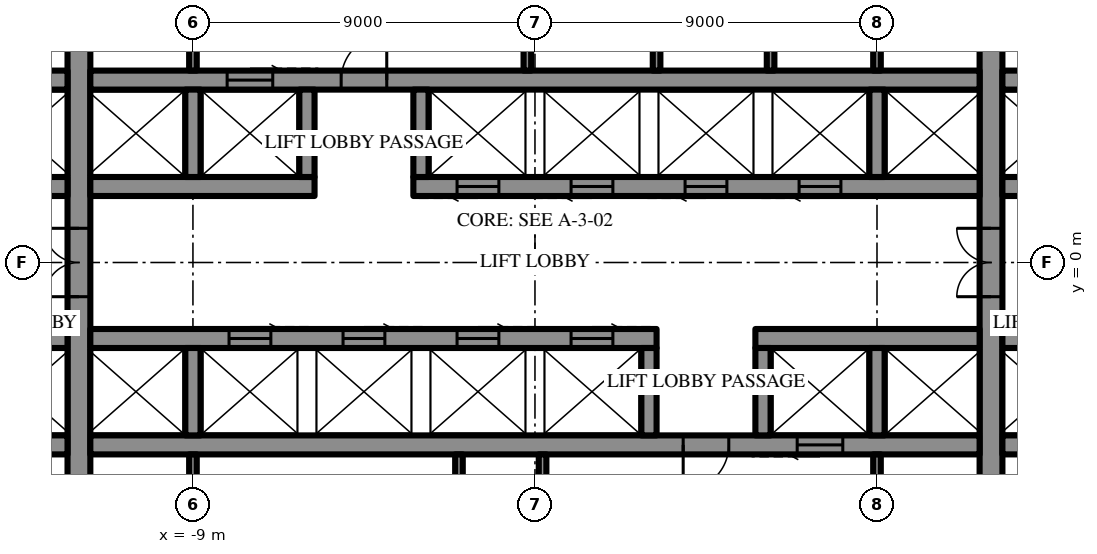
"""IFC4 building model, lengths in metres.
Left out: names, types, materials, properties, quantities, classifications, styles, units other than length and angle.
Written with IfcOpenShell. Run it as: python <this file> out.ifc"""

import sys

from ifc_helpers import new_model, si_unit, direction, frame, frame_2d, origin, place, context, subcontext, project, spatial, rectangle, extrude, element, fill, save


model = new_model("IFC4")
c1 = context("Model", 3, precision=1e-05, world=origin(), true_north=direction((0.0, 1.0)))
c2 = subcontext(c1, "Body", "Model", "MODEL_VIEW")
j1 = project(units=[si_unit("LENGTHUNIT", "METRE"), si_unit("PLANEANGLEUNIT", "RADIAN")], contexts=[c1])
p1 = place(None, origin())
s1 = spatial("IfcSite", under=j1, at=p1, CompositionType="ELEMENT")
p2 = place(p1, origin())
s2 = spatial("IfcBuilding", under=s1, at=p2, CompositionType="ELEMENT")
p3 = place(p2, frame((0.0, 0.0, 153.1)))
s3 = spatial("IfcBuildingStorey", under=s2, at=p3, CompositionType="ELEMENT", Elevation=153.1)
p4 = place(p3, frame((12.0, -10.7, 0.0), z_axis=(0.0, 0.0, 1.0), x_axis=(0.0, 1.0, 0.0)))
e1 = element("IfcWall", 1, at=p4, inside=s3, PredefinedType="SHEAR", context=c2, shape_type="SweptSolid", body=[
    extrude(rectangle(XDim=21.4, YDim=0.6, at=frame_2d((10.7, 0.0))), origin(), (0.0, 0.0, 1.0), 4.2),
])
p5 = place(p4, frame((9.8, 0.0, 0.0)))
e2 = element("IfcOpeningElement", 2, at=p5, cuts=e1, PredefinedType="OPENING", context=c2, shape_type="SweptSolid", body=[
    extrude(rectangle(XDim=1.8, YDim=2.4, at=frame_2d((0.9, 1.2))), frame((0.0, 0.31, 0.0), z_axis=(0.0, -1.0, 0.0), x_axis=(1.0, 0.0, 0.0)), (0.0, 0.0, 1.0), 0.62),
])
p6 = place(p3, frame((-12.0, -10.7, 0.0), z_axis=(0.0, 0.0, 1.0), x_axis=(0.0, 1.0, 0.0)))
e3 = element("IfcWall", 3, at=p6, inside=s3, PredefinedType="SHEAR", context=c2, shape_type="SweptSolid", body=[
    extrude(rectangle(XDim=21.4, YDim=0.6, at=frame_2d((10.7, 0.0))), origin(), (0.0, 0.0, 1.0), 4.2),
])
p7 = place(p6, frame((9.8, 0.0, 0.0)))
e4 = element("IfcOpeningElement", 4, at=p7, cuts=e3, PredefinedType="OPENING", context=c2, shape_type="SweptSolid", body=[
    extrude(rectangle(XDim=1.8, YDim=2.4, at=frame_2d((0.9, 1.2))), frame((0.0, 0.31, 0.0), z_axis=(0.0, -1.0, 0.0), x_axis=(1.0, 0.0, 0.0)), (0.0, 0.0, 1.0), 0.62),
])
p8 = place(p3, frame((-14.7, 2.0, 0.0), z_axis=(0.0, 0.0, 1.0), x_axis=(1.0, 0.0, 0.0)))
e5 = element("IfcWall", 5, at=p8, inside=s3, PredefinedType="SHEAR", context=c2, shape_type="SweptSolid", body=[
    extrude(rectangle(XDim=2.4, YDim=0.5, at=frame_2d((1.2, 0.0))), origin(), (0.0, 0.0, 1.0), 4.2),
])
p9 = place(p3, frame((-11.7, 2.0, 0.0), z_axis=(0.0, 0.0, 1.0), x_axis=(1.0, 0.0, 0.0)))
e6 = element("IfcWall", 6, at=p9, inside=s3, PredefinedType="SHEAR", context=c2, shape_type="SweptSolid", body=[
    extrude(rectangle(XDim=5.9, YDim=0.5, at=frame_2d((2.95, 0.0))), origin(), (0.0, 0.0, 1.0), 4.2),
])
p10 = place(p3, frame((-3.2, 2.0, 0.0), z_axis=(0.0, 0.0, 1.0), x_axis=(1.0, 0.0, 0.0)))
e7 = element("IfcWall", 7, at=p10, inside=s3, PredefinedType="SHEAR", context=c2, shape_type="SweptSolid", body=[
    extrude(rectangle(XDim=14.9, YDim=0.5, at=frame_2d((7.45, 0.0))), origin(), (0.0, 0.0, 1.0), 4.2),
])
p11 = place(p10, frame((1.15, 0.0, 0.0)))
e8 = element("IfcOpeningElement", 8, at=p11, cuts=e7, PredefinedType="OPENING", context=c2, shape_type="SweptSolid", body=[
    extrude(rectangle(XDim=1.1, YDim=2.2, at=frame_2d((0.55, 1.1))), frame((0.0, 0.26, 0.0), z_axis=(0.0, -1.0, 0.0), x_axis=(1.0, 0.0, 0.0)), (0.0, 0.0, 1.0), 0.52),
])
p12 = place(p10, frame((4.15, 0.0, 0.0)))
e9 = element("IfcOpeningElement", 9, at=p12, cuts=e7, PredefinedType="OPENING", context=c2, shape_type="SweptSolid", body=[
    extrude(rectangle(XDim=1.1, YDim=2.2, at=frame_2d((0.55, 1.1))), frame((0.0, 0.26, 0.0), z_axis=(0.0, -1.0, 0.0), x_axis=(1.0, 0.0, 0.0)), (0.0, 0.0, 1.0), 0.52),
])
p13 = place(p10, frame((7.15, 0.0, 0.0)))
e10 = element("IfcOpeningElement", 10, at=p13, cuts=e7, PredefinedType="OPENING", context=c2, shape_type="SweptSolid", body=[
    extrude(rectangle(XDim=1.1, YDim=2.2, at=frame_2d((0.55, 1.1))), frame((0.0, 0.26, 0.0), z_axis=(0.0, -1.0, 0.0), x_axis=(1.0, 0.0, 0.0)), (0.0, 0.0, 1.0), 0.52),
])
p14 = place(p10, frame((10.15, 0.0, 0.0)))
e11 = element("IfcOpeningElement", 11, at=p14, cuts=e7, PredefinedType="OPENING", context=c2, shape_type="SweptSolid", body=[
    extrude(rectangle(XDim=1.1, YDim=2.2, at=frame_2d((0.55, 1.1))), frame((0.0, 0.26, 0.0), z_axis=(0.0, -1.0, 0.0), x_axis=(1.0, 0.0, 0.0)), (0.0, 0.0, 1.0), 0.52),
])
for number, where, z_axis, x_axis in (
    (12, (12.3, 2.0, 0.0), (0.0, 0.0, 1.0), (1.0, 0.0, 0.0)),
    (13, (-14.7, 4.8, 0.0), (0.0, 0.0, 1.0), (1.0, 0.0, 0.0)),
):
    element("IfcWall", number, at=place(p3, frame(where, z_axis=z_axis, x_axis=x_axis)), inside=s3, PredefinedType="SHEAR", context=c2, shape_type="SweptSolid", body=[
        extrude(rectangle(XDim=2.4, YDim=0.5, at=frame_2d((1.2, 0.0))), origin(), (0.0, 0.0, 1.0), 4.2),
    ])
p15 = place(p3, frame((-11.7, 4.8, 0.0), z_axis=(0.0, 0.0, 1.0), x_axis=(1.0, 0.0, 0.0)))
e14 = element("IfcWall", 14, at=p15, inside=s3, PredefinedType="SHEAR", context=c2, shape_type="SweptSolid", body=[
    extrude(rectangle(XDim=23.4, YDim=0.5, at=frame_2d((11.7, 0.0))), origin(), (0.0, 0.0, 1.0), 4.2),
])
p16 = place(p15, frame((6.6, 0.0, 0.0)))
e15 = element("IfcOpeningElement", 15, at=p16, cuts=e14, PredefinedType="OPENING", context=c2, shape_type="SweptSolid", body=[
    extrude(rectangle(XDim=1.2, YDim=2.2, at=frame_2d((0.6, 1.1))), frame((0.0, 0.26, 0.0), z_axis=(0.0, -1.0, 0.0), x_axis=(1.0, 0.0, 0.0)), (0.0, 0.0, 1.0), 0.52),
])
p17 = place(p15, frame((3.6, 0.0, 0.0)))
e16 = element("IfcOpeningElement", 16, at=p17, cuts=e14, PredefinedType="OPENING", context=c2, shape_type="SweptSolid", body=[
    extrude(rectangle(XDim=1.2, YDim=2.2, at=frame_2d((0.6, 1.1))), frame((0.0, 0.26, 0.0), z_axis=(0.0, -1.0, 0.0), x_axis=(1.0, 0.0, 0.0)), (0.0, 0.0, 1.0), 0.52),
])
p18 = place(p3, frame((12.3, 4.8, 0.0), z_axis=(0.0, 0.0, 1.0), x_axis=(1.0, 0.0, 0.0)))
e17 = element("IfcWall", 17, at=p18, inside=s3, PredefinedType="SHEAR", context=c2, shape_type="SweptSolid", body=[
    extrude(rectangle(XDim=2.4, YDim=0.5, at=frame_2d((1.2, 0.0))), origin(), (0.0, 0.0, 1.0), 4.2),
])
for number, where, z_axis, x_axis in (
    (18, (-9.0, 2.25, 0.0), (0.0, 0.0, 1.0), (0.0, 1.0, 0.0)),
    (19, (-6.0, 2.25, 0.0), (0.0, 0.0, 1.0), (0.0, 1.0, 0.0)),
    (20, (-3.0, 2.25, 0.0), (0.0, 0.0, 1.0), (0.0, 1.0, 0.0)),
    (21, (9.0, 2.25, 0.0), (0.0, 0.0, 1.0), (0.0, 1.0, 0.0)),
):
    element("IfcWall", number, at=place(p3, frame(where, z_axis=z_axis, x_axis=x_axis)), inside=s3, PredefinedType="SHEAR", context=c2, shape_type="SweptSolid", body=[
        extrude(rectangle(XDim=2.3, YDim=0.4, at=frame_2d((1.15, 0.0))), origin(), (0.0, 0.0, 1.0), 4.2),
    ])
p19 = place(p3, frame((-0.2, 5.05, 0.0), z_axis=(0.0, 0.0, 1.0), x_axis=(0.0, 1.0, 0.0)))
e22 = element("IfcWall", 22, at=p19, inside=s3, PredefinedType="SHEAR", context=c2, shape_type="SweptSolid", body=[
    extrude(rectangle(XDim=5.65, YDim=0.2, at=frame_2d((2.825, 0.0))), origin(), (0.0, 0.0, 1.0), 4.2),
])
p20 = place(p3, frame((14.7, -2.0, 0.0), z_axis=(0.0, 0.0, 1.0), x_axis=(-1.0, 0.0, 0.0)))
e23 = element("IfcWall", 23, at=p20, inside=s3, PredefinedType="SHEAR", context=c2, shape_type="SweptSolid", body=[
    extrude(rectangle(XDim=2.4, YDim=0.5, at=frame_2d((1.2, 0.0))), origin(), (0.0, 0.0, 1.0), 4.2),
])
p21 = place(p3, frame((11.7, -2.0, 0.0), z_axis=(0.0, 0.0, 1.0), x_axis=(-1.0, 0.0, 0.0)))
e24 = element("IfcWall", 24, at=p21, inside=s3, PredefinedType="SHEAR", context=c2, shape_type="SweptSolid", body=[
    extrude(rectangle(XDim=5.9, YDim=0.5, at=frame_2d((2.95, 0.0))), origin(), (0.0, 0.0, 1.0), 4.2),
])
p22 = place(p3, frame((3.2, -2.0, 0.0), z_axis=(0.0, 0.0, 1.0), x_axis=(-1.0, 0.0, 0.0)))
e25 = element("IfcWall", 25, at=p22, inside=s3, PredefinedType="SHEAR", context=c2, shape_type="SweptSolid", body=[
    extrude(rectangle(XDim=14.9, YDim=0.5, at=frame_2d((7.45, 0.0))), origin(), (0.0, 0.0, 1.0), 4.2),
])
p23 = place(p22, frame((1.15, 0.0, 0.0)))
e26 = element("IfcOpeningElement", 26, at=p23, cuts=e25, PredefinedType="OPENING", context=c2, shape_type="SweptSolid", body=[
    extrude(rectangle(XDim=1.1, YDim=2.2, at=frame_2d((0.55, 1.1))), frame((0.0, 0.26, 0.0), z_axis=(0.0, -1.0, 0.0), x_axis=(1.0, 0.0, 0.0)), (0.0, 0.0, 1.0), 0.52),
])
p24 = place(p22, frame((4.15, 0.0, 0.0)))
e27 = element("IfcOpeningElement", 27, at=p24, cuts=e25, PredefinedType="OPENING", context=c2, shape_type="SweptSolid", body=[
    extrude(rectangle(XDim=1.1, YDim=2.2, at=frame_2d((0.55, 1.1))), frame((0.0, 0.26, 0.0), z_axis=(0.0, -1.0, 0.0), x_axis=(1.0, 0.0, 0.0)), (0.0, 0.0, 1.0), 0.52),
])
p25 = place(p22, frame((7.15, 0.0, 0.0)))
e28 = element("IfcOpeningElement", 28, at=p25, cuts=e25, PredefinedType="OPENING", context=c2, shape_type="SweptSolid", body=[
    extrude(rectangle(XDim=1.1, YDim=2.2, at=frame_2d((0.55, 1.1))), frame((0.0, 0.26, 0.0), z_axis=(0.0, -1.0, 0.0), x_axis=(1.0, 0.0, 0.0)), (0.0, 0.0, 1.0), 0.52),
])
p26 = place(p22, frame((10.15, 0.0, 0.0)))
e29 = element("IfcOpeningElement", 29, at=p26, cuts=e25, PredefinedType="OPENING", context=c2, shape_type="SweptSolid", body=[
    extrude(rectangle(XDim=1.1, YDim=2.2, at=frame_2d((0.55, 1.1))), frame((0.0, 0.26, 0.0), z_axis=(0.0, -1.0, 0.0), x_axis=(1.0, 0.0, 0.0)), (0.0, 0.0, 1.0), 0.52),
])
for number, where, z_axis, x_axis in (
    (30, (-12.3, -2.0, 0.0), (0.0, 0.0, 1.0), (-1.0, 0.0, 0.0)),
    (31, (14.7, -4.8, 0.0), (0.0, 0.0, 1.0), (-1.0, 0.0, 0.0)),
):
    element("IfcWall", number, at=place(p3, frame(where, z_axis=z_axis, x_axis=x_axis)), inside=s3, PredefinedType="SHEAR", context=c2, shape_type="SweptSolid", body=[
        extrude(rectangle(XDim=2.4, YDim=0.5, at=frame_2d((1.2, 0.0))), origin(), (0.0, 0.0, 1.0), 4.2),
    ])
p27 = place(p3, frame((11.7, -4.8, 0.0), z_axis=(0.0, 0.0, 1.0), x_axis=(-1.0, 0.0, 0.0)))
e32 = element("IfcWall", 32, at=p27, inside=s3, PredefinedType="SHEAR", context=c2, shape_type="SweptSolid", body=[
    extrude(rectangle(XDim=23.4, YDim=0.5, at=frame_2d((11.7, 0.0))), origin(), (0.0, 0.0, 1.0), 4.2),
])
p28 = place(p27, frame((6.6, 0.0, 0.0)))
e33 = element("IfcOpeningElement", 33, at=p28, cuts=e32, PredefinedType="OPENING", context=c2, shape_type="SweptSolid", body=[
    extrude(rectangle(XDim=1.2, YDim=2.2, at=frame_2d((0.6, 1.1))), frame((0.0, 0.26, 0.0), z_axis=(0.0, -1.0, 0.0), x_axis=(1.0, 0.0, 0.0)), (0.0, 0.0, 1.0), 0.52),
])
p29 = place(p27, frame((3.6, 0.0, 0.0)))
e34 = element("IfcOpeningElement", 34, at=p29, cuts=e32, PredefinedType="OPENING", context=c2, shape_type="SweptSolid", body=[
    extrude(rectangle(XDim=1.2, YDim=2.2, at=frame_2d((0.6, 1.1))), frame((0.0, 0.26, 0.0), z_axis=(0.0, -1.0, 0.0), x_axis=(1.0, 0.0, 0.0)), (0.0, 0.0, 1.0), 0.52),
])
p30 = place(p3, frame((-12.3, -4.8, 0.0), z_axis=(0.0, 0.0, 1.0), x_axis=(-1.0, 0.0, 0.0)))
e35 = element("IfcWall", 35, at=p30, inside=s3, PredefinedType="SHEAR", context=c2, shape_type="SweptSolid", body=[
    extrude(rectangle(XDim=2.4, YDim=0.5, at=frame_2d((1.2, 0.0))), origin(), (0.0, 0.0, 1.0), 4.2),
])
for number, where, z_axis, x_axis in (
    (36, (9.0, -2.25, 0.0), (0.0, 0.0, 1.0), (0.0, -1.0, 0.0)),
    (37, (6.0, -2.25, 0.0), (0.0, 0.0, 1.0), (0.0, -1.0, 0.0)),
    (38, (3.0, -2.25, 0.0), (0.0, 0.0, 1.0), (0.0, -1.0, 0.0)),
    (39, (-9.0, -2.25, 0.0), (0.0, 0.0, 1.0), (0.0, -1.0, 0.0)),
):
    element("IfcWall", number, at=place(p3, frame(where, z_axis=z_axis, x_axis=x_axis)), inside=s3, PredefinedType="SHEAR", context=c2, shape_type="SweptSolid", body=[
        extrude(rectangle(XDim=2.3, YDim=0.4, at=frame_2d((1.15, 0.0))), origin(), (0.0, 0.0, 1.0), 4.2),
    ])
p31 = place(p3, frame((0.2, -5.05, 0.0), z_axis=(0.0, 0.0, 1.0), x_axis=(0.0, -1.0, 0.0)))
e40 = element("IfcWall", 40, at=p31, inside=s3, PredefinedType="SHEAR", context=c2, shape_type="SweptSolid", body=[
    extrude(rectangle(XDim=5.65, YDim=0.2, at=frame_2d((2.825, 0.0))), origin(), (0.0, 0.0, 1.0), 4.2),
])
for number, where, z_axis, x_axis in (
    (41, (-9.0, 5.05, 0.0), (0.0, 0.0, 1.0), (0.0, 1.0, 0.0)),
    (42, (9.0, 5.05, 0.0), (0.0, 0.0, 1.0), (0.0, 1.0, 0.0)),
    (43, (3.2, 5.05, 0.0), (0.0, 0.0, 1.0), (0.0, 1.0, 0.0)),
    (44, (6.2, 5.05, 0.0), (0.0, 0.0, 1.0), (0.0, 1.0, 0.0)),
    (45, (9.0, -5.05, 0.0), (0.0, 0.0, 1.0), (0.0, -1.0, 0.0)),
    (46, (-9.0, -5.05, 0.0), (0.0, 0.0, 1.0), (0.0, -1.0, 0.0)),
    (47, (-2.0, -5.05, 0.0), (0.0, 0.0, 1.0), (0.0, -1.0, 0.0)),
):
    element("IfcWall", number, at=place(p3, frame(where, z_axis=z_axis, x_axis=x_axis)), inside=s3, PredefinedType="PARTITIONING", context=c2, shape_type="SweptSolid", body=[
        extrude(rectangle(XDim=5.65, YDim=0.2, at=frame_2d((2.825, 0.0))), origin(), (0.0, 0.0, 1.0), 4.0),
    ])
p32 = place(p16, origin())
e48 = element("IfcDoor", 48, at=p32, inside=s3, OperationType="SINGLE_SWING_LEFT", PredefinedType="DOOR", context=c2, shape_type="SweptSolid", body=[
    extrude(rectangle(XDim=1.2, YDim=2.2, at=frame_2d((0.6, 1.1))), frame((0.0, 0.025, 0.0), z_axis=(0.0, -1.0, 0.0), x_axis=(1.0, 0.0, 0.0)), (0.0, 0.0, 1.0), 0.05),
])
fill(e15, e48)
p33 = place(p28, origin())
e49 = element("IfcDoor", 49, at=p33, inside=s3, OperationType="SINGLE_SWING_LEFT", PredefinedType="DOOR", context=c2, shape_type="SweptSolid", body=[
    extrude(rectangle(XDim=1.2, YDim=2.2, at=frame_2d((0.6, 1.1))), frame((0.0, 0.025, 0.0), z_axis=(0.0, -1.0, 0.0), x_axis=(1.0, 0.0, 0.0)), (0.0, 0.0, 1.0), 0.05),
])
fill(e33, e49)
p34 = place(p5, origin())
e50 = element("IfcDoor", 50, at=p34, inside=s3, OperationType="DOUBLE_DOOR_SINGLE_SWING", PredefinedType="DOOR", context=c2, shape_type="SweptSolid", body=[
    extrude(rectangle(XDim=1.8, YDim=2.4, at=frame_2d((0.9, 1.2))), frame((0.0, 0.025, 0.0), z_axis=(0.0, -1.0, 0.0), x_axis=(1.0, 0.0, 0.0)), (0.0, 0.0, 1.0), 0.05),
])
fill(e2, e50)
p35 = place(p7, origin())
e51 = element("IfcDoor", 51, at=p35, inside=s3, OperationType="DOUBLE_DOOR_SINGLE_SWING", PredefinedType="DOOR", context=c2, shape_type="SweptSolid", body=[
    extrude(rectangle(XDim=1.8, YDim=2.4, at=frame_2d((0.9, 1.2))), frame((0.0, 0.025, 0.0), z_axis=(0.0, -1.0, 0.0), x_axis=(1.0, 0.0, 0.0)), (0.0, 0.0, 1.0), 0.05),
])
fill(e4, e51)
p36 = place(p17, origin())
e52 = element("IfcDoor", 52, at=p36, inside=s3, OperationType="SLIDING_TO_LEFT", PredefinedType="DOOR", context=c2, shape_type="SweptSolid", body=[
    extrude(rectangle(XDim=1.2, YDim=2.2, at=frame_2d((0.6, 1.1))), frame((0.0, 0.025, 0.0), z_axis=(0.0, -1.0, 0.0), x_axis=(1.0, 0.0, 0.0)), (0.0, 0.0, 1.0), 0.05),
])
fill(e16, e52)
p37 = place(p11, frame((1.1, 0.0, 0.0), z_axis=(0.0, 0.0, 1.0), x_axis=(-1.0, 0.0, 0.0)))
e53 = element("IfcDoor", 53, at=p37, inside=s3, OperationType="SLIDING_TO_LEFT", PredefinedType="DOOR", context=c2, shape_type="SweptSolid", body=[
    extrude(rectangle(XDim=1.1, YDim=2.2, at=frame_2d((0.55, 1.1))), frame((0.0, 0.025, 0.0), z_axis=(0.0, -1.0, 0.0), x_axis=(1.0, 0.0, 0.0)), (0.0, 0.0, 1.0), 0.05),
])
fill(e8, e53)
p38 = place(p12, frame((1.1, 0.0, 0.0), z_axis=(0.0, 0.0, 1.0), x_axis=(-1.0, 0.0, 0.0)))
e54 = element("IfcDoor", 54, at=p38, inside=s3, OperationType="SLIDING_TO_LEFT", PredefinedType="DOOR", context=c2, shape_type="SweptSolid", body=[
    extrude(rectangle(XDim=1.1, YDim=2.2, at=frame_2d((0.55, 1.1))), frame((0.0, 0.025, 0.0), z_axis=(0.0, -1.0, 0.0), x_axis=(1.0, 0.0, 0.0)), (0.0, 0.0, 1.0), 0.05),
])
fill(e9, e54)
p39 = place(p13, frame((1.1, 0.0, 0.0), z_axis=(0.0, 0.0, 1.0), x_axis=(-1.0, 0.0, 0.0)))
e55 = element("IfcDoor", 55, at=p39, inside=s3, OperationType="SLIDING_TO_LEFT", PredefinedType="DOOR", context=c2, shape_type="SweptSolid", body=[
    extrude(rectangle(XDim=1.1, YDim=2.2, at=frame_2d((0.55, 1.1))), frame((0.0, 0.025, 0.0), z_axis=(0.0, -1.0, 0.0), x_axis=(1.0, 0.0, 0.0)), (0.0, 0.0, 1.0), 0.05),
])
fill(e10, e55)
p40 = place(p14, frame((1.1, 0.0, 0.0), z_axis=(0.0, 0.0, 1.0), x_axis=(-1.0, 0.0, 0.0)))
e56 = element("IfcDoor", 56, at=p40, inside=s3, OperationType="SLIDING_TO_LEFT", PredefinedType="DOOR", context=c2, shape_type="SweptSolid", body=[
    extrude(rectangle(XDim=1.1, YDim=2.2, at=frame_2d((0.55, 1.1))), frame((0.0, 0.025, 0.0), z_axis=(0.0, -1.0, 0.0), x_axis=(1.0, 0.0, 0.0)), (0.0, 0.0, 1.0), 0.05),
])
fill(e11, e56)
p41 = place(p29, origin())
e57 = element("IfcDoor", 57, at=p41, inside=s3, OperationType="SLIDING_TO_LEFT", PredefinedType="DOOR", context=c2, shape_type="SweptSolid", body=[
    extrude(rectangle(XDim=1.2, YDim=2.2, at=frame_2d((0.6, 1.1))), frame((0.0, 0.025, 0.0), z_axis=(0.0, -1.0, 0.0), x_axis=(1.0, 0.0, 0.0)), (0.0, 0.0, 1.0), 0.05),
])
fill(e34, e57)
p42 = place(p23, frame((1.1, 0.0, 0.0), z_axis=(0.0, 0.0, 1.0), x_axis=(-1.0, 0.0, 0.0)))
e58 = element("IfcDoor", 58, at=p42, inside=s3, OperationType="SLIDING_TO_LEFT", PredefinedType="DOOR", context=c2, shape_type="SweptSolid", body=[
    extrude(rectangle(XDim=1.1, YDim=2.2, at=frame_2d((0.55, 1.1))), frame((0.0, 0.025, 0.0), z_axis=(0.0, -1.0, 0.0), x_axis=(1.0, 0.0, 0.0)), (0.0, 0.0, 1.0), 0.05),
])
fill(e26, e58)
p43 = place(p24, frame((1.1, 0.0, 0.0), z_axis=(0.0, 0.0, 1.0), x_axis=(-1.0, 0.0, 0.0)))
e59 = element("IfcDoor", 59, at=p43, inside=s3, OperationType="SLIDING_TO_LEFT", PredefinedType="DOOR", context=c2, shape_type="SweptSolid", body=[
    extrude(rectangle(XDim=1.1, YDim=2.2, at=frame_2d((0.55, 1.1))), frame((0.0, 0.025, 0.0), z_axis=(0.0, -1.0, 0.0), x_axis=(1.0, 0.0, 0.0)), (0.0, 0.0, 1.0), 0.05),
])
fill(e27, e59)
p44 = place(p25, frame((1.1, 0.0, 0.0), z_axis=(0.0, 0.0, 1.0), x_axis=(-1.0, 0.0, 0.0)))
e60 = element("IfcDoor", 60, at=p44, inside=s3, OperationType="SLIDING_TO_LEFT", PredefinedType="DOOR", context=c2, shape_type="SweptSolid", body=[
    extrude(rectangle(XDim=1.1, YDim=2.2, at=frame_2d((0.55, 1.1))), frame((0.0, 0.025, 0.0), z_axis=(0.0, -1.0, 0.0), x_axis=(1.0, 0.0, 0.0)), (0.0, 0.0, 1.0), 0.05),
])
fill(e28, e60)
p45 = place(p26, frame((1.1, 0.0, 0.0), z_axis=(0.0, 0.0, 1.0), x_axis=(-1.0, 0.0, 0.0)))
e61 = element("IfcDoor", 61, at=p45, inside=s3, OperationType="SLIDING_TO_LEFT", PredefinedType="DOOR", context=c2, shape_type="SweptSolid", body=[
    extrude(rectangle(XDim=1.1, YDim=2.2, at=frame_2d((0.55, 1.1))), frame((0.0, 0.025, 0.0), z_axis=(0.0, -1.0, 0.0), x_axis=(1.0, 0.0, 0.0)), (0.0, 0.0, 1.0), 0.05),
])
fill(e29, e61)
save(model, sys.argv[1])
